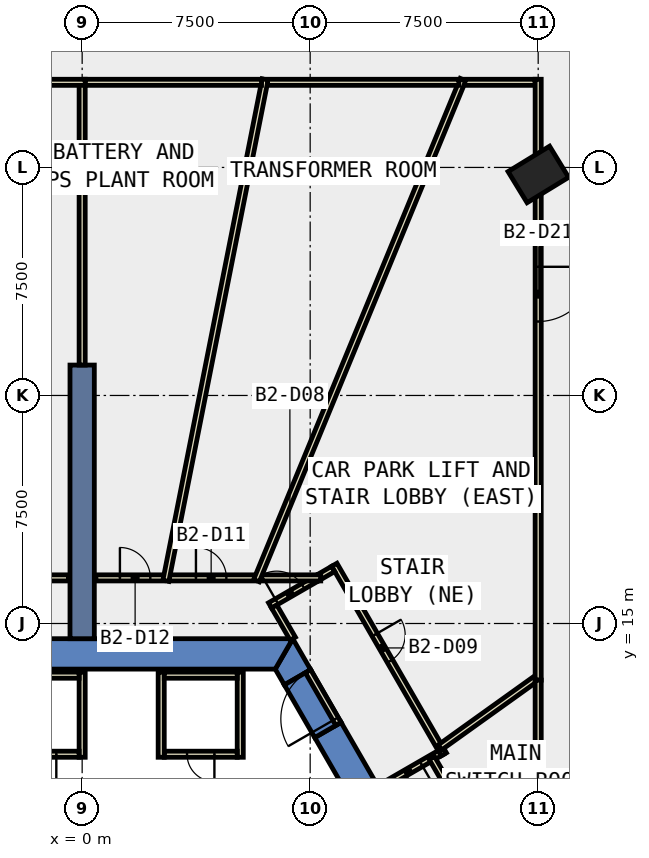
"""IFC4 building model, lengths in metres.
Left out: names, types, materials, properties, quantities, classifications, styles, units other than length and angle.
Written with IfcOpenShell. Run it as: python <this file> out.ifc"""

import sys

from ifc_helpers import new_model, si_unit, direction, frame, frame_2d, origin, origin_2d, place, context, subcontext, project, spatial, polyline, rectangle, outline, extrude, element, fill, save


model = new_model("IFC4")
c1 = context("Model", 3, precision=1e-05, world=origin(), true_north=direction((0.0, 1.0)))
c2 = subcontext(c1, "Body", "Model", "MODEL_VIEW")
j1 = project(units=[si_unit("LENGTHUNIT", "METRE"), si_unit("PLANEANGLEUNIT", "RADIAN")], contexts=[c1])
p1 = place(None, origin())
s1 = spatial("IfcSite", under=j1, at=p1, CompositionType="ELEMENT")
p2 = place(p1, origin())
s2 = spatial("IfcBuilding", under=s1, at=p2, CompositionType="ELEMENT")
p3 = place(p2, frame((0.0, 0.0, -11.0)))
s3 = spatial("IfcBuildingStorey", under=s2, at=p3, CompositionType="ELEMENT", Elevation=-11.0)
p4 = place(p3, frame((15.005, 29.769, -0.42), z_axis=(0.0, 0.0, 1.0), x_axis=(-0.521545830745, 0.853223268806, 0.0)))
e1 = element("IfcColumn", 1, at=p4, inside=s3, PredefinedType="COLUMN", context=c2, shape_type="SweptSolid", body=[
    extrude(rectangle(XDim=1.2, YDim=1.6, at=origin_2d()), origin(), (0.0, 0.0, 1.0), 5.5),
])
p5 = place(p3, frame((0.0, 0.0, -0.42)))
e2 = element("IfcWall", 2, at=p5, inside=s3, PredefinedType="SHEAR", context=c2, shape_type="SweptSolid", body=[
    extrude(outline(polyline([(8.517, 11.748), (7.651, 11.248), (12.702, 2.5), (13.856, 2.5), (8.517, 11.748)])), origin(), (0.0, 0.0, 1.0), 5.5),
])
p6 = place(p3, frame((0.0, 0.0, -0.42)))
e3 = element("IfcWall", 3, at=p6, inside=s3, PredefinedType="SHEAR", context=c2, shape_type="SweptSolid", body=[
    extrude(outline(polyline([(6.651, 12.98), (7.517, 13.48), (6.928, 14.5), (6.351, 13.5), (6.651, 12.98)])), origin(), (0.0, 0.0, 1.0), 5.5),
])
p7 = place(p3, frame((0.0, 0.0, 3.6)))
e4 = element("IfcWall", 4, at=p7, inside=s3, PredefinedType="SHEAR", context=c2, shape_type="SweptSolid", body=[
    extrude(outline(polyline([(7.517, 13.48), (6.651, 12.98), (7.651, 11.248), (8.517, 11.748), (7.517, 13.48)])), origin(), (0.0, 0.0, 1.0), 1.48),
])
p8 = place(p3, frame((0.0, 0.0, -0.42)))
e5 = element("IfcWall", 5, at=p8, inside=s3, PredefinedType="SHEAR", context=c2, shape_type="SweptSolid", body=[
    extrude(outline(polyline([(6.928, 14.5), (-6.928, 14.5), (-6.351, 13.5), (6.351, 13.5), (6.928, 14.5)])), origin(), (0.0, 0.0, 1.0), 5.5),
])
p9 = place(p3, frame((0.0, 14.5, -0.42), z_axis=(0.0, 0.0, 1.0), x_axis=(0.0, 1.0, 0.0)))
e6 = element("IfcWall", 6, at=p9, inside=s3, PredefinedType="SHEAR", context=c2, shape_type="SweptSolid", body=[
    extrude(rectangle(XDim=9.0, YDim=0.8, at=frame_2d((4.5, 0.0))), origin(), (0.0, 0.0, 1.0), 5.5),
])
p10 = place(p3, frame((11.845, 10.783, 0.0), z_axis=(0.0, 0.0, 1.0), x_axis=(-0.865973769406, -0.500089422704, 0.0)))
e7 = element("IfcWall", 7, at=p10, inside=s3, PredefinedType="PARTITIONING", context=c2, shape_type="SweptSolid", body=[
    extrude(rectangle(XDim=2.399, YDim=0.2, at=frame_2d((1.2, 0.0))), origin(), (0.0, 0.0, 1.0), 5.05),
])
p11 = place(p10, frame((0.8, 0.0, 0.0)))
e8 = element("IfcOpeningElement", 8, at=p11, cuts=e7, PredefinedType="OPENING", context=c2, shape_type="SweptSolid", body=[
    extrude(rectangle(XDim=1.0, YDim=2.1, at=frame_2d((0.5, 1.05))), frame((0.0, 0.11, 0.0), z_axis=(0.0, -1.0, 0.0), x_axis=(1.0, 0.0, 0.0)), (0.0, 0.0, 1.0), 0.22),
])
p12 = place(p3, frame((6.18, 15.595, 0.0), z_axis=(0.0, 0.0, 1.0), x_axis=(0.866102512622, 0.499866419787, 0.0)))
e9 = element("IfcWall", 9, at=p12, inside=s3, PredefinedType="PARTITIONING", context=c2, shape_type="SweptSolid", body=[
    extrude(rectangle(XDim=1.811, YDim=0.2, at=frame_2d((0.905, 0.0))), origin(), (0.0, 0.0, 1.0), 5.05),
])
p13 = place(p12, frame((0.254, 0.0, 0.0)))
e10 = element("IfcOpeningElement", 10, at=p13, cuts=e9, PredefinedType="OPENING", context=c2, shape_type="SweptSolid", body=[
    extrude(rectangle(XDim=1.0, YDim=2.1, at=frame_2d((0.5, 1.05))), frame((0.0, 0.11, 0.0), z_axis=(0.0, -1.0, 0.0), x_axis=(1.0, 0.0, 0.0)), (0.0, 0.0, 1.0), 0.22),
])
p14 = place(p3, frame((6.317, 15.558, 0.0), z_axis=(0.0, 0.0, 1.0), x_axis=(0.500114474492, -0.865959301817, 0.0)))
e11 = element("IfcWall", 11, at=p14, inside=s3, PredefinedType="PARTITIONING", context=c2, shape_type="SweptSolid", body=[
    extrude(rectangle(XDim=1.222, YDim=0.2, at=frame_2d((0.611, 0.0))), origin(), (0.0, 0.0, 1.0), 5.05),
])
p15 = place(p3, frame((8.295, 16.932, 0.0), z_axis=(0.0, 0.0, 1.0), x_axis=(0.499982693035, -0.866035395735, 0.0)))
e12 = element("IfcWall", 12, at=p15, inside=s3, PredefinedType="PARTITIONING", context=c2, shape_type="SweptSolid", body=[
    extrude(rectangle(XDim=7.2, YDim=0.2, at=frame_2d((3.6, 0.0))), origin(), (0.0, 0.0, 1.0), 5.05),
])
p16 = place(p15, frame((2.659, 0.0, 0.0)))
e13 = element("IfcOpeningElement", 13, at=p16, cuts=e12, PredefinedType="OPENING", context=c2, shape_type="SweptSolid", body=[
    extrude(rectangle(XDim=1.0, YDim=2.1, at=frame_2d((0.5, 1.05))), frame((0.0, 0.11, 0.0), z_axis=(0.0, -1.0, 0.0), x_axis=(1.0, 0.0, 0.0)), (0.0, 0.0, 1.0), 0.22),
])
p17 = place(p3, frame((7.748, 16.5, 0.0), z_axis=(0.0, 0.0, 1.0), x_axis=(0.865681519127, 0.500595153234, 0.0)))
e14 = element("IfcWall", 14, at=p17, inside=s3, PredefinedType="PARTITIONING", context=c2, shape_type="SweptSolid", body=[
    extrude(rectangle(XDim=0.589, YDim=0.2, at=frame_2d((0.294, 0.0))), origin(), (0.0, 0.0, 1.0), 5.05),
])
p18 = place(p3, frame((11.499, 10.583, 0.0), z_axis=(0.0, 0.0, 1.0), x_axis=(0.499994090379, -0.866028815679, 0.0)))
e15 = element("IfcWall", 15, at=p18, inside=s3, PredefinedType="PARTITIONING", context=c2, shape_type="SweptSolid", body=[
    extrude(rectangle(XDim=7.002, YDim=0.2, at=frame_2d((3.501, 0.0))), origin(), (0.0, 0.0, 1.0), 5.05),
])
p19 = place(p18, frame((1.952, 0.0, 0.0)))
e16 = element("IfcOpeningElement", 16, at=p19, cuts=e15, PredefinedType="OPENING", context=c2, shape_type="SweptSolid", body=[
    extrude(rectangle(XDim=1.0, YDim=2.1, at=frame_2d((0.5, 1.05))), frame((0.0, 0.11, 0.0), z_axis=(0.0, -1.0, 0.0), x_axis=(1.0, 0.0, 0.0)), (0.0, 0.0, 1.0), 0.22),
])
p20 = place(p3, frame((5.871, 16.5, 0.0), z_axis=(0.0, 0.0, 1.0), x_axis=(1.0, 0.0, 0.0)))
e17 = element("IfcWall", 17, at=p20, inside=s3, PredefinedType="PARTITIONING", context=c2, shape_type="SweptSolid", body=[
    extrude(rectangle(XDim=1.977, YDim=0.2, at=frame_2d((0.988, 0.0))), origin(), (0.0, 0.0, 1.0), 5.05),
])
p21 = place(p3, frame((2.872, 16.5, 0.0), z_axis=(0.0, 0.0, 1.0), x_axis=(1.0, 0.0, 0.0)))
e18 = element("IfcWall", 18, at=p21, inside=s3, PredefinedType="PARTITIONING", context=c2, shape_type="SweptSolid", body=[
    extrude(rectangle(XDim=2.799, YDim=0.2, at=frame_2d((1.399, 0.0))), origin(), (0.0, 0.0, 1.0), 5.05),
])
p22 = place(p21, frame((0.871, 0.0, 0.0)))
e19 = element("IfcOpeningElement", 19, at=p22, cuts=e18, PredefinedType="OPENING", context=c2, shape_type="SweptSolid", body=[
    extrude(rectangle(XDim=1.0, YDim=2.1, at=frame_2d((0.5, 1.05))), frame((0.0, 0.11, 0.0), z_axis=(0.0, -1.0, 0.0), x_axis=(1.0, 0.0, 0.0)), (0.0, 0.0, 1.0), 0.22),
])
p23 = place(p3, frame((0.45, 16.5, 0.0), z_axis=(0.0, 0.0, 1.0), x_axis=(1.0, 0.0, 0.0)))
e20 = element("IfcWall", 20, at=p23, inside=s3, PredefinedType="PARTITIONING", context=c2, shape_type="SweptSolid", body=[
    extrude(rectangle(XDim=2.222, YDim=0.2, at=frame_2d((1.111, 0.0))), origin(), (0.0, 0.0, 1.0), 5.05),
])
p24 = place(p23, frame((0.792, 0.0, 0.0)))
e21 = element("IfcOpeningElement", 21, at=p24, cuts=e20, PredefinedType="OPENING", context=c2, shape_type="SweptSolid", body=[
    extrude(rectangle(XDim=1.0, YDim=2.1, at=frame_2d((0.5, 1.05))), frame((0.0, 0.11, 0.0), z_axis=(0.0, -1.0, 0.0), x_axis=(1.0, 0.0, 0.0)), (0.0, 0.0, 1.0), 0.22),
])
p25 = place(p3, frame((14.919, 13.18, 0.0), z_axis=(0.0, 0.0, 1.0), x_axis=(-0.81313339858, -0.582077379833, 0.0)))
e22 = element("IfcWall", 22, at=p25, inside=s3, PredefinedType="PARTITIONING", context=c2, shape_type="SweptSolid", body=[
    extrude(rectangle(XDim=3.879, YDim=0.2, at=frame_2d((1.939, 0.0))), origin(), (0.0, 0.0, 1.0), 5.05),
])
p26 = place(p3, frame((5.733, 16.408, 0.0), z_axis=(0.0, 0.0, 1.0), x_axis=(0.381113406353, 0.924528296754, 0.0)))
e23 = element("IfcWall", 23, at=p26, inside=s3, PredefinedType="PARTITIONING", context=c2, shape_type="SweptSolid", body=[
    extrude(rectangle(XDim=17.83, YDim=0.2, at=frame_2d((8.915, 0.0))), origin(), (0.0, 0.0, 1.0), 5.05),
])
p27 = place(p3, frame((12.59, 32.8, 0.0), z_axis=(0.0, 0.0, 1.0), x_axis=(1.0, 0.0, 0.0)))
e24 = element("IfcWall", 24, at=p27, inside=s3, PredefinedType="PARTITIONING", context=c2, shape_type="SweptSolid", body=[
    extrude(rectangle(XDim=2.31, YDim=0.2, at=frame_2d((1.155, 0.0))), origin(), (0.0, 0.0, 1.0), 5.05),
])
p28 = place(p3, frame((15.0, 32.9, 0.0), z_axis=(0.0, 0.0, 1.0), x_axis=(0.0, -1.0, 0.0)))
e25 = element("IfcWall", 25, at=p28, inside=s3, PredefinedType="PARTITIONING", context=c2, shape_type="SweptSolid", body=[
    extrude(rectangle(XDim=19.762, YDim=0.2, at=frame_2d((9.881, 0.0))), origin(), (0.0, 0.0, 1.0), 5.05),
])
p29 = place(p28, frame((6.168, 0.0, 0.0)))
e26 = element("IfcOpeningElement", 26, at=p29, cuts=e25, PredefinedType="OPENING", context=c2, shape_type="SweptSolid", body=[
    extrude(rectangle(XDim=1.8, YDim=2.1, at=frame_2d((0.9, 1.05))), frame((0.0, 0.11, 0.0), z_axis=(0.0, -1.0, 0.0), x_axis=(1.0, 0.0, 0.0)), (0.0, 0.0, 1.0), 0.22),
])
p30 = place(p3, frame((15.0, 13.138, 0.0), z_axis=(0.0, 0.0, 1.0), x_axis=(0.0, -1.0, 0.0)))
e27 = element("IfcWall", 27, at=p30, inside=s3, PredefinedType="PARTITIONING", context=c2, shape_type="SweptSolid", body=[
    extrude(rectangle(XDim=8.719, YDim=0.2, at=frame_2d((4.359, 0.0))), origin(), (0.0, 0.0, 1.0), 5.05),
])
p31 = place(p3, frame((2.753, 16.402, 0.0), z_axis=(0.0, 0.0, 1.0), x_axis=(0.194225601905, 0.98095688772, 0.0)))
e28 = element("IfcWall", 28, at=p31, inside=s3, PredefinedType="PARTITIONING", context=c2, shape_type="SweptSolid", body=[
    extrude(rectangle(XDim=16.816, YDim=0.2, at=frame_2d((8.408, 0.0))), origin(), (0.0, 0.0, 1.0), 5.05),
])
p32 = place(p3, frame((6.1, 32.8, 0.0), z_axis=(0.0, 0.0, 1.0), x_axis=(1.0, 0.0, 0.0)))
e29 = element("IfcWall", 29, at=p32, inside=s3, PredefinedType="PARTITIONING", context=c2, shape_type="SweptSolid", body=[
    extrude(rectangle(XDim=6.29, YDim=0.2, at=frame_2d((3.145, 0.0))), origin(), (0.0, 0.0, 1.0), 5.05),
])
p33 = place(p3, frame((0.0, 23.5, 0.0), z_axis=(0.0, 0.0, 1.0), x_axis=(0.0, 1.0, 0.0)))
e30 = element("IfcWall", 30, at=p33, inside=s3, PredefinedType="PARTITIONING", context=c2, shape_type="SweptSolid", body=[
    extrude(rectangle(XDim=9.3, YDim=0.2, at=frame_2d((4.65, 0.0))), origin(), (0.0, 0.0, 1.0), 5.05),
])
p34 = place(p3, frame((0.1, 32.8, 0.0), z_axis=(0.0, 0.0, 1.0), x_axis=(1.0, 0.0, 0.0)))
e31 = element("IfcWall", 31, at=p34, inside=s3, PredefinedType="PARTITIONING", context=c2, shape_type="SweptSolid", body=[
    extrude(rectangle(XDim=5.8, YDim=0.2, at=frame_2d((2.9, 0.0))), origin(), (0.0, 0.0, 1.0), 5.05),
])
p35 = place(p3, frame((-7.983, 16.5, 0.0), z_axis=(0.0, 0.0, 1.0), x_axis=(1.0, 0.0, 0.0)))
e32 = element("IfcWall", 32, at=p35, inside=s3, PredefinedType="PARTITIONING", context=c2, shape_type="SweptSolid", body=[
    extrude(rectangle(XDim=7.533, YDim=0.2, at=frame_2d((3.767, 0.0))), origin(), (0.0, 0.0, 1.0), 5.05),
])
p36 = place(p3, frame((-14.9, 32.8, 0.0), z_axis=(0.0, 0.0, 1.0), x_axis=(1.0, 0.0, 0.0)))
e33 = element("IfcWall", 33, at=p36, inside=s3, PredefinedType="PARTITIONING", context=c2, shape_type="SweptSolid", body=[
    extrude(rectangle(XDim=15.0, YDim=0.2, at=frame_2d((7.5, 0.0))), origin(), (0.0, 0.0, 1.0), 5.05),
])
p37 = place(p3, frame((5.2, 13.4, 0.0), z_axis=(0.0, 0.0, 1.0), x_axis=(0.0, -1.0, 0.0)))
e34 = element("IfcWall", 34, at=p37, inside=s3, PredefinedType="PARTITIONING", context=c2, shape_type="SweptSolid", body=[
    extrude(rectangle(XDim=2.8, YDim=0.2, at=frame_2d((1.4, 0.0))), origin(), (0.0, 0.0, 1.0), 5.05),
])
p38 = place(p3, frame((5.1, 10.7, 0.0), z_axis=(0.0, 0.0, 1.0), x_axis=(-1.0, 0.0, 0.0)))
e35 = element("IfcWall", 35, at=p38, inside=s3, PredefinedType="PARTITIONING", context=c2, shape_type="SweptSolid", body=[
    extrude(rectangle(XDim=2.4, YDim=0.2, at=frame_2d((1.2, 0.0))), origin(), (0.0, 0.0, 1.0), 5.05),
])
p39 = place(p38, frame((0.75, 0.0, 0.0)))
e36 = element("IfcOpeningElement", 36, at=p39, cuts=e35, PredefinedType="OPENING", context=c2, shape_type="SweptSolid", body=[
    extrude(rectangle(XDim=0.9, YDim=2.1, at=frame_2d((0.45, 1.05))), frame((0.0, 0.11, 0.0), z_axis=(0.0, -1.0, 0.0), x_axis=(1.0, 0.0, 0.0)), (0.0, 0.0, 1.0), 0.22),
])
p40 = place(p3, frame((2.6, 10.6, 0.0), z_axis=(0.0, 0.0, 1.0), x_axis=(0.0, 1.0, 0.0)))
e37 = element("IfcWall", 37, at=p40, inside=s3, PredefinedType="PARTITIONING", context=c2, shape_type="SweptSolid", body=[
    extrude(rectangle(XDim=2.8, YDim=0.2, at=frame_2d((1.4, 0.0))), origin(), (0.0, 0.0, 1.0), 5.05),
])
p41 = place(p3, frame((2.7, 13.3, 0.0), z_axis=(0.0, 0.0, 1.0), x_axis=(1.0, 0.0, 0.0)))
e38 = element("IfcWall", 38, at=p41, inside=s3, PredefinedType="PARTITIONING", context=c2, shape_type="SweptSolid", body=[
    extrude(rectangle(XDim=2.4, YDim=0.2, at=frame_2d((1.2, 0.0))), origin(), (0.0, 0.0, 1.0), 5.05),
])
p42 = place(p3, frame((0.0, 13.4, 0.0), z_axis=(0.0, 0.0, 1.0), x_axis=(0.0, -1.0, 0.0)))
e39 = element("IfcWall", 39, at=p42, inside=s3, PredefinedType="PARTITIONING", context=c2, shape_type="SweptSolid", body=[
    extrude(rectangle(XDim=2.8, YDim=0.2, at=frame_2d((1.4, 0.0))), origin(), (0.0, 0.0, 1.0), 5.05),
])
p43 = place(p3, frame((-0.1, 10.7, 0.0), z_axis=(0.0, 0.0, 1.0), x_axis=(-1.0, 0.0, 0.0)))
e40 = element("IfcWall", 40, at=p43, inside=s3, PredefinedType="PARTITIONING", context=c2, shape_type="SweptSolid", body=[
    extrude(rectangle(XDim=2.4, YDim=0.2, at=frame_2d((1.2, 0.0))), origin(), (0.0, 0.0, 1.0), 5.05),
])
p44 = place(p43, frame((0.75, 0.0, 0.0)))
e41 = element("IfcOpeningElement", 41, at=p44, cuts=e40, PredefinedType="OPENING", context=c2, shape_type="SweptSolid", body=[
    extrude(rectangle(XDim=0.9, YDim=2.1, at=frame_2d((0.45, 1.05))), frame((0.0, 0.11, 0.0), z_axis=(0.0, -1.0, 0.0), x_axis=(1.0, 0.0, 0.0)), (0.0, 0.0, 1.0), 0.22),
])
p45 = place(p3, frame((-2.5, 13.3, 0.0), z_axis=(0.0, 0.0, 1.0), x_axis=(1.0, 0.0, 0.0)))
e42 = element("IfcWall", 42, at=p45, inside=s3, PredefinedType="PARTITIONING", context=c2, shape_type="SweptSolid", body=[
    extrude(rectangle(XDim=2.4, YDim=0.2, at=frame_2d((1.2, 0.0))), origin(), (0.0, 0.0, 1.0), 5.05),
])
p46 = place(p3, frame((8.43, 11.698, 0.0), z_axis=(0.0, 0.0, 1.0), x_axis=(-0.50002537861, 0.866010750942, 0.0)))
e43 = element("IfcWall", 43, at=p46, inside=s3, PredefinedType="PARTITIONING", context=c2, shape_type="SweptSolid", body=[
    extrude(rectangle(XDim=2.0, YDim=0.2, at=frame_2d((1.0, 0.0))), origin(), (0.0, 0.0, 1.0), 2.4),
])
p47 = place(p46, frame((0.19, 0.0, 0.0)))
e44 = element("IfcOpeningElement", 44, at=p47, cuts=e43, PredefinedType="OPENING", context=c2, shape_type="SweptSolid", body=[
    extrude(rectangle(XDim=1.8, YDim=2.1, at=frame_2d((0.9, 1.05))), frame((0.0, 0.11, 0.0), z_axis=(0.0, -1.0, 0.0), x_axis=(1.0, 0.0, 0.0)), (0.0, 0.0, 1.0), 0.22),
])
p48 = place(p11, origin())
e45 = element("IfcDoor", 45, at=p48, inside=s3, OperationType="SINGLE_SWING_LEFT", PredefinedType="DOOR", context=c2, shape_type="SweptSolid", body=[
    extrude(rectangle(XDim=1.0, YDim=2.1, at=frame_2d((0.5, 1.05))), frame((0.0, 0.025, 0.0), z_axis=(0.0, -1.0, 0.0), x_axis=(1.0, 0.0, 0.0)), (0.0, 0.0, 1.0), 0.05),
])
fill(e8, e45)
p49 = place(p13, origin())
e46 = element("IfcDoor", 46, at=p49, inside=s3, OperationType="SINGLE_SWING_RIGHT", PredefinedType="DOOR", context=c2, shape_type="SweptSolid", body=[
    extrude(rectangle(XDim=1.0, YDim=2.1, at=frame_2d((0.5, 1.05))), frame((0.0, 0.025, 0.0), z_axis=(0.0, -1.0, 0.0), x_axis=(1.0, 0.0, 0.0)), (0.0, 0.0, 1.0), 0.05),
])
fill(e10, e46)
p50 = place(p16, origin())
e47 = element("IfcDoor", 47, at=p50, inside=s3, OperationType="SINGLE_SWING_LEFT", PredefinedType="DOOR", context=c2, shape_type="SweptSolid", body=[
    extrude(rectangle(XDim=1.0, YDim=2.1, at=frame_2d((0.5, 1.05))), frame((0.0, 0.025, 0.0), z_axis=(0.0, -1.0, 0.0), x_axis=(1.0, 0.0, 0.0)), (0.0, 0.0, 1.0), 0.05),
])
fill(e13, e47)
p51 = place(p22, origin())
e48 = element("IfcDoor", 48, at=p51, inside=s3, OperationType="SINGLE_SWING_LEFT", PredefinedType="DOOR", context=c2, shape_type="SweptSolid", body=[
    extrude(rectangle(XDim=1.0, YDim=2.1, at=frame_2d((0.5, 1.05))), frame((0.0, 0.025, 0.0), z_axis=(0.0, -1.0, 0.0), x_axis=(1.0, 0.0, 0.0)), (0.0, 0.0, 1.0), 0.05),
])
fill(e19, e48)
p52 = place(p24, origin())
e49 = element("IfcDoor", 49, at=p52, inside=s3, OperationType="SINGLE_SWING_RIGHT", PredefinedType="DOOR", context=c2, shape_type="SweptSolid", body=[
    extrude(rectangle(XDim=1.0, YDim=2.1, at=frame_2d((0.5, 1.05))), frame((0.0, 0.025, 0.0), z_axis=(0.0, -1.0, 0.0), x_axis=(1.0, 0.0, 0.0)), (0.0, 0.0, 1.0), 0.05),
])
fill(e21, e49)
p53 = place(p29, origin())
e50 = element("IfcDoor", 50, at=p53, inside=s3, OperationType="DOUBLE_DOOR_SINGLE_SWING", PredefinedType="DOOR", context=c2, shape_type="SweptSolid", body=[
    extrude(rectangle(XDim=1.8, YDim=2.1, at=frame_2d((0.9, 1.05))), frame((0.0, 0.025, 0.0), z_axis=(0.0, -1.0, 0.0), x_axis=(1.0, 0.0, 0.0)), (0.0, 0.0, 1.0), 0.05),
])
fill(e26, e50)
p54 = place(p39, origin())
e51 = element("IfcDoor", 51, at=p54, inside=s3, OperationType="SINGLE_SWING_RIGHT", PredefinedType="DOOR", context=c2, shape_type="SweptSolid", body=[
    extrude(rectangle(XDim=0.9, YDim=2.1, at=frame_2d((0.45, 1.05))), frame((0.0, 0.025, 0.0), z_axis=(0.0, -1.0, 0.0), x_axis=(1.0, 0.0, 0.0)), (0.0, 0.0, 1.0), 0.05),
])
fill(e36, e51)
p55 = place(p44, origin())
e52 = element("IfcDoor", 52, at=p55, inside=s3, OperationType="SINGLE_SWING_RIGHT", PredefinedType="DOOR", context=c2, shape_type="SweptSolid", body=[
    extrude(rectangle(XDim=0.9, YDim=2.1, at=frame_2d((0.45, 1.05))), frame((0.0, 0.025, 0.0), z_axis=(0.0, -1.0, 0.0), x_axis=(1.0, 0.0, 0.0)), (0.0, 0.0, 1.0), 0.05),
])
fill(e41, e52)
p56 = place(p47, origin())
e53 = element("IfcDoor", 53, at=p56, inside=s3, OperationType="DOUBLE_DOOR_SINGLE_SWING", PredefinedType="DOOR", context=c2, shape_type="SweptSolid", body=[
    extrude(rectangle(XDim=1.8, YDim=2.1, at=frame_2d((0.9, 1.05))), frame((0.0, 0.025, 0.0), z_axis=(0.0, -1.0, 0.0), x_axis=(1.0, 0.0, 0.0)), (0.0, 0.0, 1.0), 0.05),
])
fill(e44, e53)
save(model, sys.argv[1])
